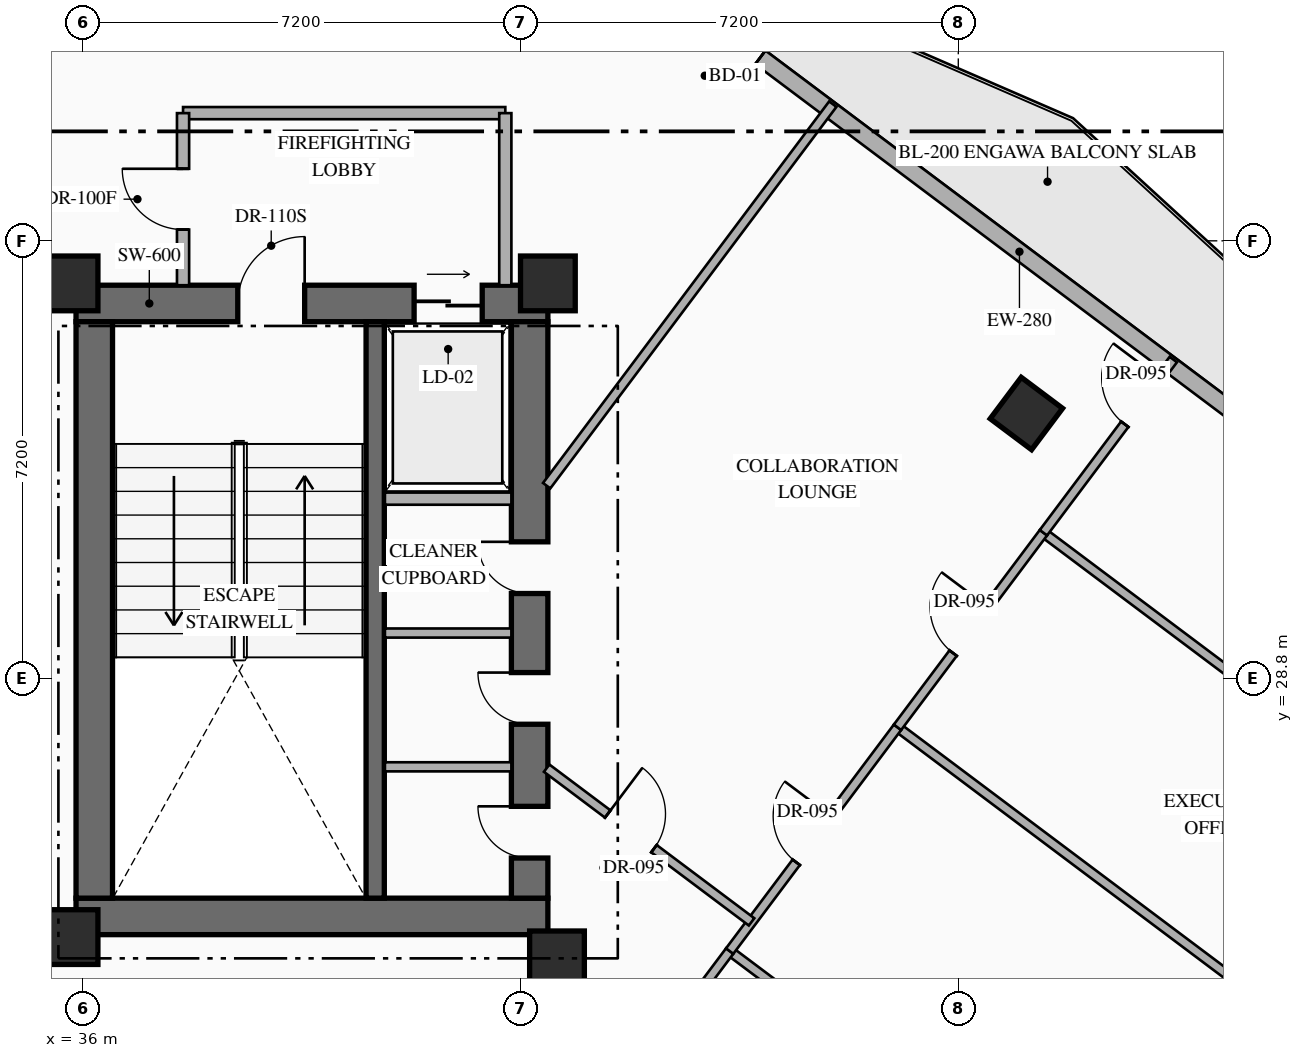
"""IFC4 building model, lengths in metres.
Left out: names, types, materials, properties, quantities, classifications, styles, units other than length and angle.
Written with IfcOpenShell. Run it as: python <this file> out.ifc"""

import sys

from ifc_helpers import new_model, si_unit, direction, frame, frame_2d, origin, origin_2d, place, context, subcontext, project, spatial, rectangle, hollow_rectangle, extrude, element, fill, save


model = new_model("IFC4")
c1 = context("Model", 3, precision=1e-05, world=origin(), true_north=direction((0.0, 1.0)))
c2 = subcontext(c1, "Body", "Model", "MODEL_VIEW")
j1 = project(units=[si_unit("LENGTHUNIT", "METRE"), si_unit("PLANEANGLEUNIT", "RADIAN")], contexts=[c1])
p1 = place(None, origin())
s1 = spatial("IfcSite", under=j1, at=p1, CompositionType="ELEMENT")
p2 = place(p1, origin())
s2 = spatial("IfcBuilding", under=s1, at=p2, CompositionType="ELEMENT")
p3 = place(p2, frame((0.0, 0.0, 149.25)))
s3 = spatial("IfcBuildingStorey", under=s2, at=p3, CompositionType="ELEMENT", Elevation=149.25)
p4 = place(p3, frame((35.89, 24.89, 0.0), z_axis=(0.0, 0.0, 1.0), x_axis=(1.0, 0.0, 0.0)))
e1 = element("IfcWall", 1, at=p4, inside=s3, PredefinedType="SHEAR", context=c2, shape_type="SweptSolid", body=[
    extrude(rectangle(XDim=7.76, YDim=0.6, at=frame_2d((3.88, 0.0))), origin(), (0.0, 0.0, 1.0), 3.6),
])
p5 = place(p3, frame((35.89, 34.97, 0.0), z_axis=(0.0, 0.0, 1.0), x_axis=(1.0, 0.0, 0.0)))
e2 = element("IfcWall", 2, at=p5, inside=s3, PredefinedType="SHEAR", context=c2, shape_type="SweptSolid", body=[
    extrude(rectangle(XDim=7.76, YDim=0.6, at=frame_2d((3.88, 0.0))), origin(), (0.0, 0.0, 1.0), 3.6),
])
p6 = place(p5, frame((2.66, 0.0, 0.0)))
e3 = element("IfcOpeningElement", 3, at=p6, cuts=e2, PredefinedType="OPENING", context=c2, shape_type="SweptSolid", body=[
    extrude(rectangle(XDim=1.1, YDim=2.2, at=frame_2d((0.55, 1.1))), frame((0.0, 0.31, 0.0), z_axis=(0.0, -1.0, 0.0), x_axis=(1.0, 0.0, 0.0)), (0.0, 0.0, 1.0), 0.62),
])
p7 = place(p5, frame((5.56, 0.0, 0.0)))
e4 = element("IfcOpeningElement", 4, at=p7, cuts=e2, PredefinedType="OPENING", context=c2, shape_type="SweptSolid", body=[
    extrude(rectangle(XDim=1.12, YDim=2.15, at=frame_2d((0.56, 1.075))), frame((0.0, 0.31, 0.0), z_axis=(0.0, -1.0, 0.0), x_axis=(1.0, 0.0, 0.0)), (0.0, 0.0, 1.0), 0.62),
])
p8 = place(p3, frame((36.19, 25.19, 0.0), z_axis=(0.0, 0.0, 1.0), x_axis=(0.0, 1.0, 0.0)))
e5 = element("IfcWall", 5, at=p8, inside=s3, PredefinedType="SHEAR", context=c2, shape_type="SweptSolid", body=[
    extrude(rectangle(XDim=9.48, YDim=0.6, at=frame_2d((4.74, 0.0))), origin(), (0.0, 0.0, 1.0), 3.6),
])
p9 = place(p3, frame((43.35, 25.19, 0.0), z_axis=(0.0, 0.0, 1.0), x_axis=(0.0, 1.0, 0.0)))
e6 = element("IfcWall", 6, at=p9, inside=s3, PredefinedType="SHEAR", context=c2, shape_type="SweptSolid", body=[
    extrude(rectangle(XDim=9.48, YDim=0.6, at=frame_2d((4.74, 0.0))), origin(), (0.0, 0.0, 1.0), 3.6),
])
p10 = place(p9, frame((0.66, 0.0, 0.0)))
e7 = element("IfcOpeningElement", 7, at=p10, cuts=e6, PredefinedType="OPENING", context=c2, shape_type="SweptSolid", body=[
    extrude(rectangle(XDim=0.85, YDim=2.08, at=frame_2d((0.425, 1.04))), frame((0.0, 0.31, 0.0), z_axis=(0.0, -1.0, 0.0), x_axis=(1.0, 0.0, 0.0)), (0.0, 0.0, 1.0), 0.62),
])
p11 = place(p9, frame((2.86, 0.0, 0.0)))
e8 = element("IfcOpeningElement", 8, at=p11, cuts=e6, PredefinedType="OPENING", context=c2, shape_type="SweptSolid", body=[
    extrude(rectangle(XDim=0.85, YDim=2.08, at=frame_2d((0.425, 1.04))), frame((0.0, 0.31, 0.0), z_axis=(0.0, -1.0, 0.0), x_axis=(1.0, 0.0, 0.0)), (0.0, 0.0, 1.0), 0.62),
])
p12 = place(p9, frame((5.01, 0.0, 0.0)))
e9 = element("IfcOpeningElement", 9, at=p12, cuts=e6, PredefinedType="OPENING", context=c2, shape_type="SweptSolid", body=[
    extrude(rectangle(XDim=0.85, YDim=2.08, at=frame_2d((0.425, 1.04))), frame((0.0, 0.31, 0.0), z_axis=(0.0, -1.0, 0.0), x_axis=(1.0, 0.0, 0.0)), (0.0, 0.0, 1.0), 0.62),
])
p13 = place(p3, frame((40.81, 25.19, 0.0), z_axis=(0.0, 0.0, 1.0), x_axis=(0.0, 1.0, 0.0)))
e10 = element("IfcWall", 10, at=p13, inside=s3, PredefinedType="SHEAR", context=c2, shape_type="SweptSolid", body=[
    extrude(rectangle(XDim=9.48, YDim=0.3, at=frame_2d((4.74, 0.0))), origin(), (0.0, 0.0, 1.0), 3.6),
])
for number, where, z_axis, x_axis in (
    (11, (35.8, 24.55, 0.0), (0.0, 0.0, 1.0), (1.0, 0.0, 0.0)),
    (12, (43.8, 24.2, 0.0), (0.0, 0.0, 1.0), (1.0, 0.0, 0.0)),
    (13, (35.8, 35.3, 0.0), (0.0, 0.0, 1.0), (1.0, 0.0, 0.0)),
    (14, (43.65, 35.3, 0.0), (0.0, 0.0, 1.0), (1.0, 0.0, 0.0)),
):
    element("IfcColumn", number, at=place(p3, frame(where, z_axis=z_axis, x_axis=x_axis)), inside=s3, PredefinedType="COLUMN", context=c2, shape_type="SweptSolid", body=[
        extrude(rectangle(XDim=0.9, YDim=0.9, at=origin_2d()), origin(), (0.0, 0.0, 1.0), 3.6),
    ])
p14 = place(p3, frame((51.52, 33.16, 0.0), z_axis=(0.0, 0.0, 1.0), x_axis=(0.799999996291, -0.600000004945, 0.0)))
e15 = element("IfcColumn", 15, at=p14, inside=s3, PredefinedType="COLUMN", context=c2, shape_type="SweptSolid", body=[
    extrude(hollow_rectangle(XDim=0.85, YDim=0.85, WallThickness=0.032, at=origin_2d()), origin(), (0.0, 0.0, 1.0), 3.6),
])
p15 = place(p3, frame((44.86, 40.73, 0.0), z_axis=(0.0, 0.0, 1.0), x_axis=(0.800007624502, -0.599989833863, 0.0)))
e16 = element("IfcWall", 16, at=p15, inside=s3, PredefinedType="STANDARD", context=c2, shape_type="SweptSolid", body=[
    extrude(rectangle(XDim=19.212, YDim=0.28, at=frame_2d((9.606, 0.0))), origin(), (0.0, 0.0, 1.0), 3.35),
])
p16 = place(p15, frame((1.755, 0.0, 0.0)))
e17 = element("IfcOpeningElement", 17, at=p16, cuts=e16, PredefinedType="OPENING", context=c2, shape_type="SweptSolid", body=[
    extrude(rectangle(XDim=1.1, YDim=2.2, at=frame_2d((0.55, 1.1))), frame((0.0, 0.15, 0.0), z_axis=(0.0, -1.0, 0.0), x_axis=(1.0, 0.0, 0.0)), (0.0, 0.0, 1.0), 0.3),
])
p17 = place(p15, frame((13.509, 0.0, 0.85)))
e18 = element("IfcOpeningElement", 18, at=p17, cuts=e16, PredefinedType="OPENING", context=c2, shape_type="SweptSolid", body=[
    extrude(rectangle(XDim=1.8, YDim=2.1, at=frame_2d((0.9, 1.05))), frame((0.0, 0.15, 0.0), z_axis=(0.0, -1.0, 0.0), x_axis=(1.0, 0.0, 0.0)), (0.0, 0.0, 1.0), 0.3),
])
p18 = place(p3, frame((40.97, 31.76, 0.0), z_axis=(0.0, 0.0, 1.0), x_axis=(1.0, 0.0, 0.0)))
e19 = element("IfcWall", 19, at=p18, inside=s3, PredefinedType="STANDARD", context=c2, shape_type="SweptSolid", body=[
    extrude(rectangle(XDim=2.08, YDim=0.2, at=frame_2d((1.04, 0.0))), origin(), (0.0, 0.0, 1.0), 3.35),
])
for number, where, z_axis, x_axis in (
    (20, (40.97, 27.35, 0.0), (0.0, 0.0, 1.0), (1.0, 0.0, 0.0)),
    (21, (40.97, 29.55, 0.0), (0.0, 0.0, 1.0), (1.0, 0.0, 0.0)),
):
    element("IfcWall", number, at=place(p3, frame(where, z_axis=z_axis, x_axis=x_axis)), inside=s3, PredefinedType="PARTITIONING", context=c2, shape_type="SweptSolid", body=[
        extrude(rectangle(XDim=2.08, YDim=0.15, at=frame_2d((1.04, 0.0))), origin(), (0.0, 0.0, 1.0), 3.35),
    ])
p19 = place(p3, frame((37.65, 38.1, 0.0), z_axis=(0.0, 0.0, 1.0), x_axis=(1.0, 0.0, 0.0)))
e22 = element("IfcWall", 22, at=p19, inside=s3, PredefinedType="STANDARD", context=c2, shape_type="SweptSolid", body=[
    extrude(rectangle(XDim=5.3, YDim=0.2, at=frame_2d((2.65, 0.0))), origin(), (0.0, 0.0, 1.0), 3.35),
])
p20 = place(p3, frame((42.95, 35.27, 0.0), z_axis=(0.0, 0.0, 1.0), x_axis=(0.0, 1.0, 0.0)))
e23 = element("IfcWall", 23, at=p20, inside=s3, PredefinedType="STANDARD", context=c2, shape_type="SweptSolid", body=[
    extrude(rectangle(XDim=2.83, YDim=0.2, at=frame_2d((1.415, 0.0))), origin(), (0.0, 0.0, 1.0), 3.35),
])
p21 = place(p3, frame((37.65, 35.27, 0.0), z_axis=(0.0, 0.0, 1.0), x_axis=(0.0, 1.0, 0.0)))
e24 = element("IfcWall", 24, at=p21, inside=s3, PredefinedType="STANDARD", context=c2, shape_type="SweptSolid", body=[
    extrude(rectangle(XDim=2.83, YDim=0.2, at=frame_2d((1.415, 0.0))), origin(), (0.0, 0.0, 1.0), 3.35),
])
p22 = place(p21, frame((0.915, 0.0, 0.0)))
e25 = element("IfcOpeningElement", 25, at=p22, cuts=e24, PredefinedType="OPENING", context=c2, shape_type="SweptSolid", body=[
    extrude(rectangle(XDim=1.0, YDim=2.2, at=frame_2d((0.5, 1.1))), frame((0.0, 0.11, 0.0), z_axis=(0.0, -1.0, 0.0), x_axis=(1.0, 0.0, 0.0)), (0.0, 0.0, 1.0), 0.22),
])
p23 = place(p3, frame((46.64, 24.32, 0.0), z_axis=(0.0, 0.0, 1.0), x_axis=(0.8, -0.6, 0.0)))
e26 = element("IfcWall", 26, at=p23, inside=s3, PredefinedType="PARTITIONING", context=c2, shape_type="SweptSolid", body=[
    extrude(rectangle(XDim=10.36, YDim=0.15, at=frame_2d((5.18, 0.0))), origin(), (0.0, 0.0, 1.0), 3.35),
])
p24 = place(p3, frame((44.12, 20.96, 0.0), z_axis=(0.0, 0.0, 1.0), x_axis=(0.59995349547, 0.800034876286, 0.0)))
e27 = element("IfcWall", 27, at=p24, inside=s3, PredefinedType="PARTITIONING", context=c2, shape_type="SweptSolid", body=[
    extrude(rectangle(XDim=4.2, YDim=0.15, at=frame_2d((2.1, 0.0))), origin(), (0.0, 0.0, 1.0), 3.35),
])
p25 = place(p24, frame((1.625, 0.0, 0.0)))
e28 = element("IfcOpeningElement", 28, at=p25, cuts=e27, PredefinedType="OPENING", context=c2, shape_type="SweptSolid", body=[
    extrude(rectangle(XDim=0.95, YDim=2.15, at=frame_2d((0.475, 1.075))), frame((0.0, 0.085, 0.0), z_axis=(0.0, -1.0, 0.0), x_axis=(1.0, 0.0, 0.0)), (0.0, 0.0, 1.0), 0.17),
])
p26 = place(p3, frame((49.4, 28.0, 0.0), z_axis=(0.0, 0.0, 1.0), x_axis=(0.8, -0.6, 0.0)))
e29 = element("IfcWall", 29, at=p26, inside=s3, PredefinedType="PARTITIONING", context=c2, shape_type="SweptSolid", body=[
    extrude(rectangle(XDim=10.36, YDim=0.15, at=frame_2d((5.18, 0.0))), origin(), (0.0, 0.0, 1.0), 3.35),
])
p27 = place(p3, frame((46.64, 24.32, 0.0), z_axis=(0.0, 0.0, 1.0), x_axis=(0.600008491904, 0.799993631001, 0.0)))
e30 = element("IfcWall", 30, at=p27, inside=s3, PredefinedType="PARTITIONING", context=c2, shape_type="SweptSolid", body=[
    extrude(rectangle(XDim=4.6, YDim=0.15, at=frame_2d((2.3, 0.0))), origin(), (0.0, 0.0, 1.0), 3.35),
])
p28 = place(p27, frame((1.825, 0.0, 0.0)))
e31 = element("IfcOpeningElement", 31, at=p28, cuts=e30, PredefinedType="OPENING", context=c2, shape_type="SweptSolid", body=[
    extrude(rectangle(XDim=0.95, YDim=2.15, at=frame_2d((0.475, 1.075))), frame((0.0, 0.085, 0.0), z_axis=(0.0, -1.0, 0.0), x_axis=(1.0, 0.0, 0.0)), (0.0, 0.0, 1.0), 0.17),
])
p29 = place(p3, frame((51.8, 31.2, 0.0), z_axis=(0.0, 0.0, 1.0), x_axis=(0.799991516197, -0.600011311571, 0.0)))
e32 = element("IfcWall", 32, at=p29, inside=s3, PredefinedType="PARTITIONING", context=c2, shape_type="SweptSolid", body=[
    extrude(rectangle(XDim=10.36, YDim=0.15, at=frame_2d((5.18, 0.0))), origin(), (0.0, 0.0, 1.0), 3.35),
])
p30 = place(p3, frame((49.4, 28.0, 0.0), z_axis=(0.0, 0.0, 1.0), x_axis=(0.600029296115, 0.799978027076, 0.0)))
e33 = element("IfcWall", 33, at=p30, inside=s3, PredefinedType="PARTITIONING", context=c2, shape_type="SweptSolid", body=[
    extrude(rectangle(XDim=4.0, YDim=0.15, at=frame_2d((2.0, 0.0))), origin(), (0.0, 0.0, 1.0), 3.35),
])
p31 = place(p30, frame((1.525, 0.0, 0.0)))
e34 = element("IfcOpeningElement", 34, at=p31, cuts=e33, PredefinedType="OPENING", context=c2, shape_type="SweptSolid", body=[
    extrude(rectangle(XDim=0.95, YDim=2.15, at=frame_2d((0.475, 1.075))), frame((0.0, 0.085, 0.0), z_axis=(0.0, -1.0, 0.0), x_axis=(1.0, 0.0, 0.0)), (0.0, 0.0, 1.0), 0.17),
])
p32 = place(p3, frame((51.8, 31.2, 0.0), z_axis=(0.0, 0.0, 1.0), x_axis=(0.599978055212, 0.800016458121, 0.0)))
e35 = element("IfcWall", 35, at=p32, inside=s3, PredefinedType="PARTITIONING", context=c2, shape_type="SweptSolid", body=[
    extrude(rectangle(XDim=3.56, YDim=0.15, at=frame_2d((1.78, 0.0))), origin(), (0.0, 0.0, 1.0), 3.35),
])
p33 = place(p32, frame((2.23, 0.0, 0.0)))
e36 = element("IfcOpeningElement", 36, at=p33, cuts=e35, PredefinedType="OPENING", context=c2, shape_type="SweptSolid", body=[
    extrude(rectangle(XDim=0.95, YDim=2.15, at=frame_2d((0.475, 1.075))), frame((0.0, 0.085, 0.0), z_axis=(0.0, -1.0, 0.0), x_axis=(1.0, 0.0, 0.0)), (0.0, 0.0, 1.0), 0.17),
])
p34 = place(p3, frame((43.63, 27.328, 0.0), z_axis=(0.0, 0.0, 1.0), x_axis=(0.799972182084, -0.600037088764, 0.0)))
e37 = element("IfcWall", 37, at=p34, inside=s3, PredefinedType="PARTITIONING", context=c2, shape_type="SweptSolid", body=[
    extrude(rectangle(XDim=4.213, YDim=0.15, at=frame_2d((2.106, 0.0))), origin(), (0.0, 0.0, 1.0), 3.045),
])
p35 = place(p34, frame((1.256, 0.0, 0.0)))
e38 = element("IfcOpeningElement", 38, at=p35, cuts=e37, PredefinedType="OPENING", context=c2, shape_type="SweptSolid", body=[
    extrude(rectangle(XDim=0.95, YDim=2.15, at=frame_2d((0.475, 1.075))), frame((0.0, 0.085, 0.0), z_axis=(0.0, -1.0, 0.0), x_axis=(1.0, 0.0, 0.0)), (0.0, 0.0, 1.0), 0.17),
])
p36 = place(p3, frame((43.63, 31.973, 0.0), z_axis=(0.0, 0.0, 1.0), x_axis=(0.599975099311, 0.800018674911, 0.0)))
e39 = element("IfcWall", 39, at=p36, inside=s3, PredefinedType="PARTITIONING", context=c2, shape_type="SweptSolid", body=[
    extrude(rectangle(XDim=7.844, YDim=0.15, at=frame_2d((3.922, 0.0))), origin(), (0.0, 0.0, 1.0), 3.35),
])
p37 = place(p3, frame((27.91, 26.68, 0.0), z_axis=(0.0, 0.0, 1.0), x_axis=(0.800005938517, -0.599992081896, 0.0)))
e40 = element("IfcWall", 40, at=p37, inside=s3, PredefinedType="PARTITIONING", context=c2, shape_type="SweptSolid", body=[
    extrude(rectangle(XDim=14.8, YDim=0.15, at=frame_2d((7.4, 0.0))), origin(), (0.0, 0.0, 1.0), 3.35),
])
p38 = place(p37, frame((9.281, 0.0, 0.0)))
e41 = element("IfcOpeningElement", 41, at=p38, cuts=e40, PredefinedType="OPENING", context=c2, shape_type="SweptSolid", body=[
    extrude(rectangle(XDim=0.95, YDim=2.15, at=frame_2d((0.475, 1.075))), frame((0.0, 0.085, 0.0), z_axis=(0.0, -1.0, 0.0), x_axis=(1.0, 0.0, 0.0)), (0.0, 0.0, 1.0), 0.17),
])
p39 = place(p16, origin())
e42 = element("IfcDoor", 42, at=p39, inside=s3, OperationType="SINGLE_SWING_LEFT", PredefinedType="DOOR", context=c2, shape_type="SweptSolid", body=[
    extrude(rectangle(XDim=1.1, YDim=2.2, at=frame_2d((0.55, 1.1))), frame((0.0, 0.025, 0.0), z_axis=(0.0, -1.0, 0.0), x_axis=(1.0, 0.0, 0.0)), (0.0, 0.0, 1.0), 0.05),
])
fill(e17, e42)
p40 = place(p6, origin())
e43 = element("IfcDoor", 43, at=p40, inside=s3, OperationType="SINGLE_SWING_RIGHT", PredefinedType="DOOR", context=c2, shape_type="SweptSolid", body=[
    extrude(rectangle(XDim=1.1, YDim=2.2, at=frame_2d((0.55, 1.1))), frame((0.0, 0.025, 0.0), z_axis=(0.0, -1.0, 0.0), x_axis=(1.0, 0.0, 0.0)), (0.0, 0.0, 1.0), 0.05),
])
fill(e3, e43)
p41 = place(p7, origin())
e44 = element("IfcDoor", 44, at=p41, inside=s3, OperationType="SLIDING_TO_RIGHT", PredefinedType="USERDEFINED", context=c2, shape_type="SweptSolid", body=[
    extrude(rectangle(XDim=1.12, YDim=2.15, at=frame_2d((0.56, 1.075))), frame((0.0, 0.025, 0.0), z_axis=(0.0, -1.0, 0.0), x_axis=(1.0, 0.0, 0.0)), (0.0, 0.0, 1.0), 0.05),
])
fill(e4, e44)
p42 = place(p10, origin())
e45 = element("IfcDoor", 45, at=p42, inside=s3, OperationType="SINGLE_SWING_RIGHT", PredefinedType="DOOR", context=c2, shape_type="SweptSolid", body=[
    extrude(rectangle(XDim=0.85, YDim=2.08, at=frame_2d((0.425, 1.04))), frame((0.0, 0.025, 0.0), z_axis=(0.0, -1.0, 0.0), x_axis=(1.0, 0.0, 0.0)), (0.0, 0.0, 1.0), 0.05),
])
fill(e7, e45)
p43 = place(p11, origin())
e46 = element("IfcDoor", 46, at=p43, inside=s3, OperationType="SINGLE_SWING_RIGHT", PredefinedType="DOOR", context=c2, shape_type="SweptSolid", body=[
    extrude(rectangle(XDim=0.85, YDim=2.08, at=frame_2d((0.425, 1.04))), frame((0.0, 0.025, 0.0), z_axis=(0.0, -1.0, 0.0), x_axis=(1.0, 0.0, 0.0)), (0.0, 0.0, 1.0), 0.05),
])
fill(e8, e46)
p44 = place(p12, origin())
e47 = element("IfcDoor", 47, at=p44, inside=s3, OperationType="SINGLE_SWING_RIGHT", PredefinedType="DOOR", context=c2, shape_type="SweptSolid", body=[
    extrude(rectangle(XDim=0.85, YDim=2.08, at=frame_2d((0.425, 1.04))), frame((0.0, 0.025, 0.0), z_axis=(0.0, -1.0, 0.0), x_axis=(1.0, 0.0, 0.0)), (0.0, 0.0, 1.0), 0.05),
])
fill(e9, e47)
p45 = place(p22, origin())
e48 = element("IfcDoor", 48, at=p45, inside=s3, OperationType="SINGLE_SWING_RIGHT", PredefinedType="DOOR", context=c2, shape_type="SweptSolid", body=[
    extrude(rectangle(XDim=1.0, YDim=2.2, at=frame_2d((0.5, 1.1))), frame((0.0, 0.025, 0.0), z_axis=(0.0, -1.0, 0.0), x_axis=(1.0, 0.0, 0.0)), (0.0, 0.0, 1.0), 0.05),
])
fill(e25, e48)
p46 = place(p28, origin())
e49 = element("IfcDoor", 49, at=p46, inside=s3, OperationType="SINGLE_SWING_RIGHT", PredefinedType="DOOR", context=c2, shape_type="SweptSolid", body=[
    extrude(rectangle(XDim=0.95, YDim=2.15, at=frame_2d((0.475, 1.075))), frame((0.0, 0.025, 0.0), z_axis=(0.0, -1.0, 0.0), x_axis=(1.0, 0.0, 0.0)), (0.0, 0.0, 1.0), 0.05),
])
fill(e31, e49)
p47 = place(p31, origin())
e50 = element("IfcDoor", 50, at=p47, inside=s3, OperationType="SINGLE_SWING_RIGHT", PredefinedType="DOOR", context=c2, shape_type="SweptSolid", body=[
    extrude(rectangle(XDim=0.95, YDim=2.15, at=frame_2d((0.475, 1.075))), frame((0.0, 0.025, 0.0), z_axis=(0.0, -1.0, 0.0), x_axis=(1.0, 0.0, 0.0)), (0.0, 0.0, 1.0), 0.05),
])
fill(e34, e50)
p48 = place(p33, origin())
e51 = element("IfcDoor", 51, at=p48, inside=s3, OperationType="SINGLE_SWING_RIGHT", PredefinedType="DOOR", context=c2, shape_type="SweptSolid", body=[
    extrude(rectangle(XDim=0.95, YDim=2.15, at=frame_2d((0.475, 1.075))), frame((0.0, 0.025, 0.0), z_axis=(0.0, -1.0, 0.0), x_axis=(1.0, 0.0, 0.0)), (0.0, 0.0, 1.0), 0.05),
])
fill(e36, e51)
p49 = place(p35, origin())
e52 = element("IfcDoor", 52, at=p49, inside=s3, OperationType="SINGLE_SWING_LEFT", PredefinedType="DOOR", context=c2, shape_type="SweptSolid", body=[
    extrude(rectangle(XDim=0.95, YDim=2.15, at=frame_2d((0.475, 1.075))), frame((0.0, 0.025, 0.0), z_axis=(0.0, -1.0, 0.0), x_axis=(1.0, 0.0, 0.0)), (0.0, 0.0, 1.0), 0.05),
])
fill(e38, e52)
save(model, sys.argv[1])
